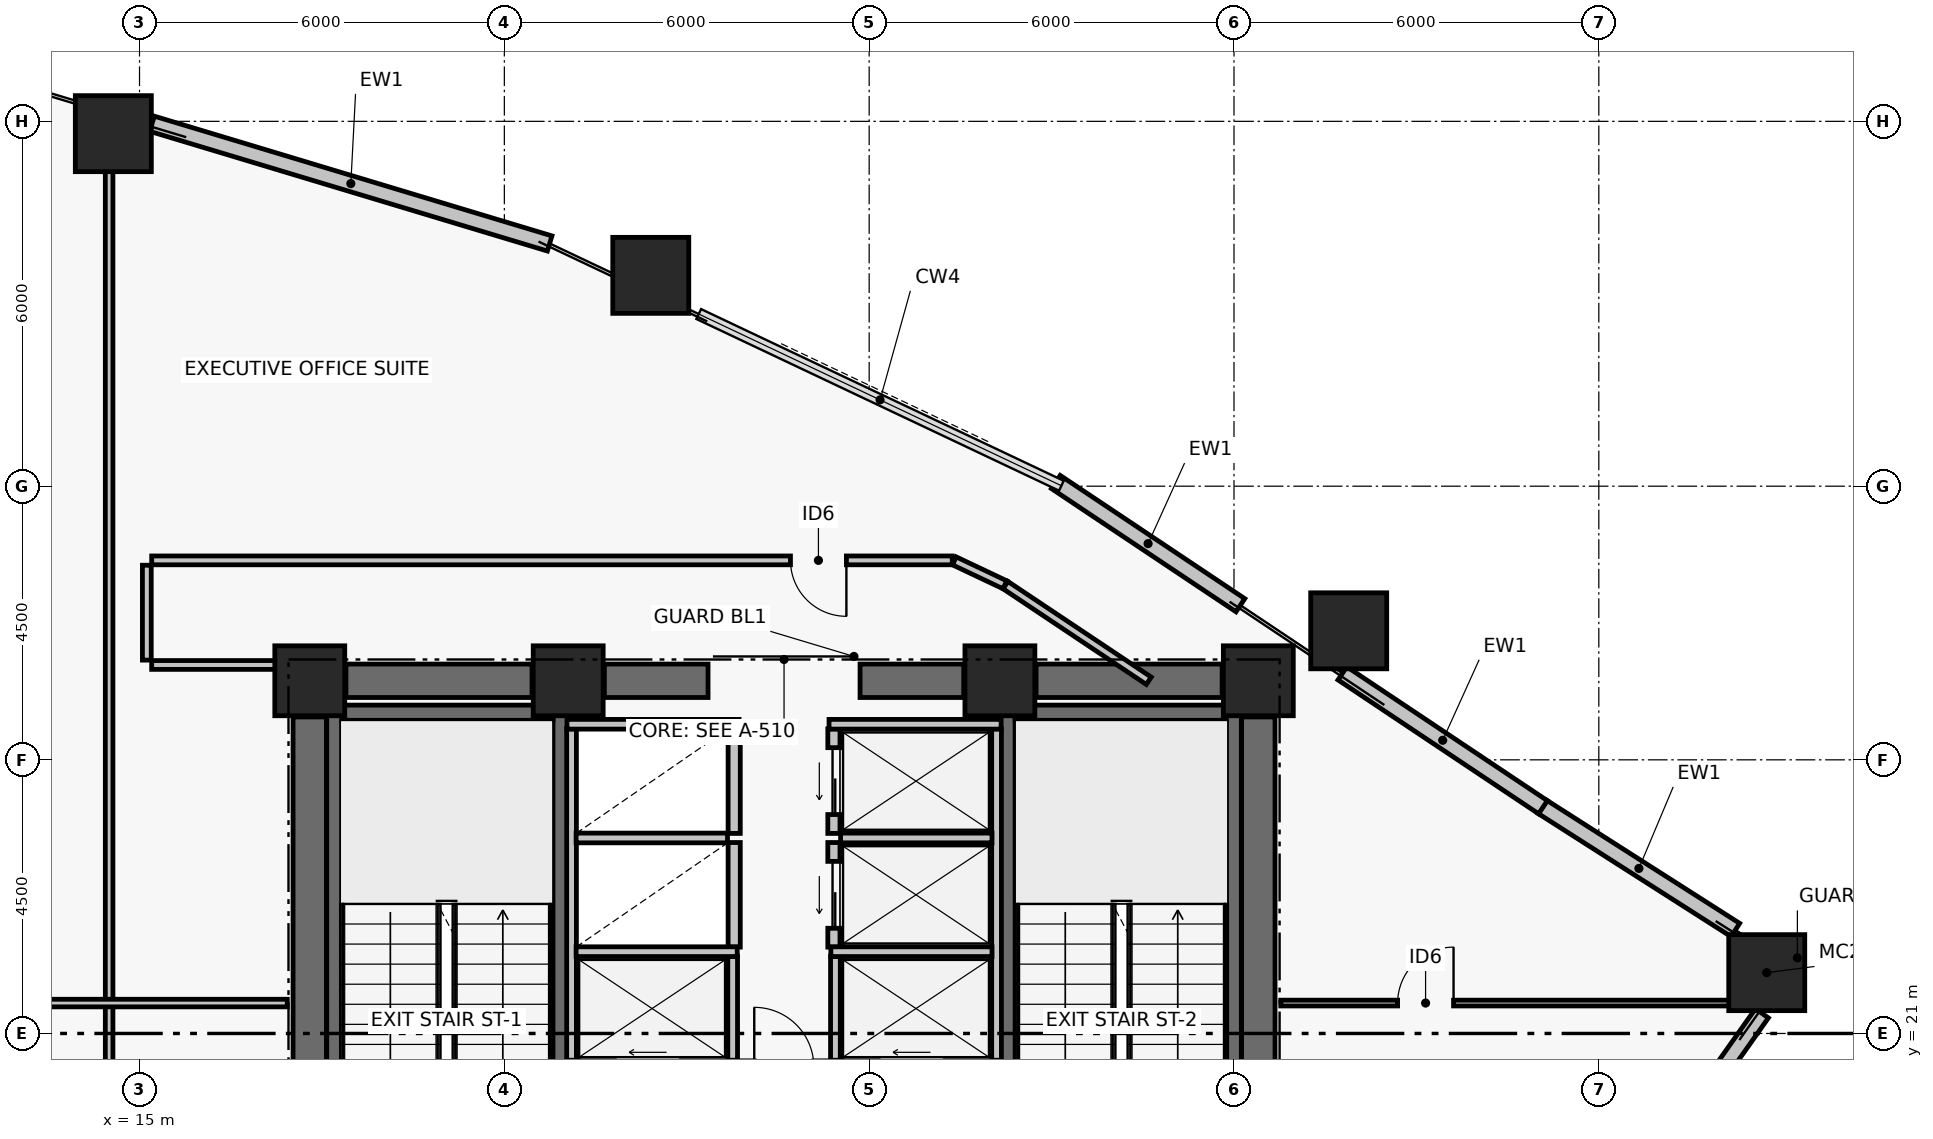
"""IFC4 building model, lengths in metres.
Left out: names, types, materials, properties, quantities, classifications, styles, units other than length and angle.
Written with IfcOpenShell. Run it as: python <this file> out.ifc"""

import sys

from ifc_helpers import new_model, si_unit, direction, frame, frame_2d, origin, origin_2d, place, context, subcontext, project, spatial, rectangle, hollow_rectangle, extrude, element, fill, save


model = new_model("IFC4")
c1 = context("Model", 3, precision=1e-05, world=origin(), true_north=direction((0.0, 1.0)))
c2 = subcontext(c1, "Body", "Model", "MODEL_VIEW")
j1 = project(units=[si_unit("LENGTHUNIT", "METRE"), si_unit("PLANEANGLEUNIT", "RADIAN")], contexts=[c1])
p1 = place(None, origin())
s1 = spatial("IfcSite", under=j1, at=p1, CompositionType="ELEMENT")
p2 = place(p1, origin())
s2 = spatial("IfcBuilding", under=s1, at=p2, CompositionType="ELEMENT")
p3 = place(p2, frame((0.0, 0.0, 103.98)))
s3 = spatial("IfcBuildingStorey", under=s2, at=p3, CompositionType="ELEMENT", Elevation=103.98)
for number, where, z_axis, x_axis in (
    (1, (17.8, 26.8, 0.0), (0.0, 0.0, 1.0), (1.0, 0.0, 0.0)),
    (2, (22.05, 26.8, 0.0), (0.0, 0.0, 1.0), (1.0, 0.0, 0.0)),
    (3, (29.15, 26.8, 0.0), (0.0, 0.0, 1.0), (1.0, 0.0, 0.0)),
    (4, (33.4, 26.8, 0.0), (0.0, 0.0, 1.0), (1.0, 0.0, 0.0)),
):
    element("IfcColumn", number, at=place(p3, frame(where, z_axis=z_axis, x_axis=x_axis)), inside=s3, PredefinedType="COLUMN", context=c2, shape_type="SweptSolid", body=[
        extrude(rectangle(XDim=1.15, YDim=1.15, at=origin_2d()), origin(), (0.0, 0.0, 1.0), 3.72),
    ])
p4 = place(p3, frame((18.395, 26.8, 0.0), z_axis=(0.0, 0.0, 1.0), x_axis=(1.0, 0.0, 0.0)))
e5 = element("IfcWall", 5, at=p4, inside=s3, PredefinedType="SHEAR", context=c2, shape_type="SweptSolid", body=[
    extrude(rectangle(XDim=3.06, YDim=0.55, at=frame_2d((1.53, 0.0))), origin(), (0.0, 0.0, 1.0), 3.47),
])
p5 = place(p3, frame((22.645, 26.8, 0.0), z_axis=(0.0, 0.0, 1.0), x_axis=(1.0, 0.0, 0.0)))
e6 = element("IfcWall", 6, at=p5, inside=s3, PredefinedType="SHEAR", context=c2, shape_type="SweptSolid", body=[
    extrude(rectangle(XDim=1.705, YDim=0.55, at=frame_2d((0.853, 0.0))), origin(), (0.0, 0.0, 1.0), 3.47),
])
p6 = place(p3, frame((26.85, 26.8, 0.0), z_axis=(0.0, 0.0, 1.0), x_axis=(1.0, 0.0, 0.0)))
e7 = element("IfcWall", 7, at=p6, inside=s3, PredefinedType="SHEAR", context=c2, shape_type="SweptSolid", body=[
    extrude(rectangle(XDim=1.705, YDim=0.55, at=frame_2d((0.853, 0.0))), origin(), (0.0, 0.0, 1.0), 3.47),
])
p7 = place(p3, frame((29.745, 26.8, 0.0), z_axis=(0.0, 0.0, 1.0), x_axis=(1.0, 0.0, 0.0)))
e8 = element("IfcWall", 8, at=p7, inside=s3, PredefinedType="SHEAR", context=c2, shape_type="SweptSolid", body=[
    extrude(rectangle(XDim=3.06, YDim=0.55, at=frame_2d((1.53, 0.0))), origin(), (0.0, 0.0, 1.0), 3.47),
])
for number, where, z_axis, x_axis in (
    (9, (17.8, 17.795, 0.0), (0.0, 0.0, 1.0), (0.0, 1.0, 0.0)),
    (10, (33.4, 17.795, 0.0), (0.0, 0.0, 1.0), (0.0, 1.0, 0.0)),
):
    element("IfcWall", number, at=place(p3, frame(where, z_axis=z_axis, x_axis=x_axis)), inside=s3, PredefinedType="SHEAR", context=c2, shape_type="SweptSolid", body=[
        extrude(rectangle(XDim=8.41, YDim=0.55, at=frame_2d((4.205, 0.0))), origin(), (0.0, 0.0, 1.0), 3.47),
    ])
p8 = place(p3, frame((18.204, 17.6, 0.0), z_axis=(0.0, 0.0, 1.0), x_axis=(0.0, 1.0, 0.0)))
e11 = element("IfcWall", 11, at=p8, inside=s3, PredefinedType="SHEAR", context=c2, shape_type="SweptSolid", body=[
    extrude(rectangle(XDim=8.8, YDim=0.25, at=frame_2d((4.4, 0.0))), origin(), (0.0, 0.0, 1.0), 3.47),
])
p9 = place(p3, frame((21.925, 17.6, 0.0), z_axis=(0.0, 0.0, 1.0), x_axis=(0.0, 1.0, 0.0)))
e12 = element("IfcWall", 12, at=p9, inside=s3, PredefinedType="SHEAR", context=c2, shape_type="SweptSolid", body=[
    extrude(rectangle(XDim=8.8, YDim=0.25, at=frame_2d((4.4, 0.0))), origin(), (0.0, 0.0, 1.0), 3.47),
])
p10 = place(p9, frame((0.35, 0.0, 0.0)))
e13 = element("IfcOpeningElement", 13, at=p10, cuts=e12, PredefinedType="OPENING", context=c2, shape_type="SweptSolid", body=[
    extrude(rectangle(XDim=1.05, YDim=2.08, at=frame_2d((0.525, 1.04))), frame((0.0, 0.135, 0.0), z_axis=(0.0, -1.0, 0.0), x_axis=(1.0, 0.0, 0.0)), (0.0, 0.0, 1.0), 0.27),
])
p11 = place(p3, frame((18.329, 26.275, 0.0), z_axis=(0.0, 0.0, 1.0), x_axis=(1.0, 0.0, 0.0)))
e14 = element("IfcWall", 14, at=p11, inside=s3, PredefinedType="SHEAR", context=c2, shape_type="SweptSolid", body=[
    extrude(rectangle(XDim=3.471, YDim=0.25, at=frame_2d((1.735, 0.0))), origin(), (0.0, 0.0, 1.0), 3.47),
])
p12 = place(p3, frame((29.275, 17.6, 0.0), z_axis=(0.0, 0.0, 1.0), x_axis=(0.0, 1.0, 0.0)))
e15 = element("IfcWall", 15, at=p12, inside=s3, PredefinedType="SHEAR", context=c2, shape_type="SweptSolid", body=[
    extrude(rectangle(XDim=8.8, YDim=0.25, at=frame_2d((4.4, 0.0))), origin(), (0.0, 0.0, 1.0), 3.47),
])
p13 = place(p12, frame((0.35, 0.0, 0.0)))
e16 = element("IfcOpeningElement", 16, at=p13, cuts=e15, PredefinedType="OPENING", context=c2, shape_type="SweptSolid", body=[
    extrude(rectangle(XDim=1.05, YDim=2.08, at=frame_2d((0.525, 1.04))), frame((0.0, 0.135, 0.0), z_axis=(0.0, -1.0, 0.0), x_axis=(1.0, 0.0, 0.0)), (0.0, 0.0, 1.0), 0.27),
])
p14 = place(p3, frame((32.996, 17.6, 0.0), z_axis=(0.0, 0.0, 1.0), x_axis=(0.0, 1.0, 0.0)))
e17 = element("IfcWall", 17, at=p14, inside=s3, PredefinedType="SHEAR", context=c2, shape_type="SweptSolid", body=[
    extrude(rectangle(XDim=8.8, YDim=0.25, at=frame_2d((4.4, 0.0))), origin(), (0.0, 0.0, 1.0), 3.47),
])
p15 = place(p3, frame((29.4, 26.275, 0.0), z_axis=(0.0, 0.0, 1.0), x_axis=(1.0, 0.0, 0.0)))
e18 = element("IfcWall", 18, at=p15, inside=s3, PredefinedType="SHEAR", context=c2, shape_type="SweptSolid", body=[
    extrude(rectangle(XDim=3.471, YDim=0.25, at=frame_2d((1.736, 0.0))), origin(), (0.0, 0.0, 1.0), 3.47),
])
for number, where, z_axis, x_axis in (
    (19, (41.762, 22.0, 0.0), (0.0, 0.0, 1.0), (1.0, 0.0, 0.0)),
    (20, (34.887, 27.622, 0.0), (0.0, 0.0, 1.0), (1.0, 0.0, 0.0)),
    (21, (23.408, 33.467, 0.0), (0.0, 0.0, 1.0), (1.0, 0.0, 0.0)),
    (22, (14.569, 35.797, 0.0), (0.0, 0.0, 1.0), (1.0, 0.0, 0.0)),
):
    element("IfcColumn", number, at=place(p3, frame(where, z_axis=z_axis, x_axis=x_axis)), inside=s3, PredefinedType="COLUMN", context=c2, shape_type="SweptSolid", body=[
        extrude(hollow_rectangle(XDim=1.25, YDim=1.25, WallThickness=0.05, at=origin_2d()), origin(), (0.0, 0.0, 1.0), 3.72),
    ])
p16 = place(p3, frame((41.682, 21.331, 0.0), z_axis=(0.0, 0.0, 1.0), x_axis=(-0.577134204686, -0.816649318729, 0.0)))
e23 = element("IfcWall", 23, at=p16, inside=s3, PredefinedType="PARTITIONING", context=c2, shape_type="SweptSolid", body=[
    extrude(rectangle(XDim=2.21, YDim=0.26, at=frame_2d((1.105, 0.0))), origin(), (0.0, 0.0, 1.0), 3.47),
])
p17 = place(p3, frame((38.072, 24.727, 0.0), z_axis=(0.0, 0.0, 1.0), x_axis=(0.843033549628, -0.537860980367, 0.0)))
e24 = element("IfcWall", 24, at=p17, inside=s3, PredefinedType="PARTITIONING", context=c2, shape_type="SweptSolid", body=[
    extrude(rectangle(XDim=3.766, YDim=0.26, at=frame_2d((1.883, 0.0))), origin(), (0.0, 0.0, 1.0), 2.9),
])
p18 = place(p3, frame((34.783, 26.922, 0.0), z_axis=(0.0, 0.0, 1.0), x_axis=(0.831718676225, -0.555197301523, 0.0)))
e25 = element("IfcWall", 25, at=p18, inside=s3, PredefinedType="PARTITIONING", context=c2, shape_type="SweptSolid", body=[
    extrude(rectangle(XDim=3.966, YDim=0.26, at=frame_2d((1.983, 0.0))), origin(), (0.0, 0.0, 1.0), 2.77),
])
p19 = place(p3, frame((30.07, 30.069, 0.0), z_axis=(0.0, 0.0, 1.0), x_axis=(0.831720838908, -0.555194061681, 0.0)))
e26 = element("IfcWall", 26, at=p19, inside=s3, PredefinedType="PARTITIONING", context=c2, shape_type="SweptSolid", body=[
    extrude(rectangle(XDim=3.65, YDim=0.26, at=frame_2d((1.825, 0.0))), origin(), (0.0, 0.0, 1.0), 2.9),
])
p20 = place(p3, frame((15.205, 35.961, 0.0), z_axis=(0.0, 0.0, 1.0), x_axis=(0.957547425539, -0.288275784351, 0.0)))
e27 = element("IfcWall", 27, at=p20, inside=s3, PredefinedType="PARTITIONING", context=c2, shape_type="SweptSolid", body=[
    extrude(rectangle(XDim=6.83, YDim=0.26, at=frame_2d((3.415, 0.0))), origin(), (0.0, 0.0, 1.0), 2.9),
])
for number, where, z_axis, x_axis in (
    (28, (24.78, 22.42, 0.0), (0.0, 0.0, 1.0), (0.0, 1.0, 0.0)),
    (29, (24.78, 24.29, 0.0), (0.0, 0.0, 1.0), (0.0, 1.0, 0.0)),
):
    element("IfcWall", number, at=place(p3, frame(where, z_axis=z_axis, x_axis=x_axis)), inside=s3, PredefinedType="PARTITIONING", context=c2, shape_type="SweptSolid", body=[
        extrude(rectangle(XDim=1.72, YDim=0.2, at=frame_2d((0.86, 0.0))), origin(), (0.0, 0.0, 1.0), 3.47),
    ])
p21 = place(p3, frame((26.42, 22.42, 0.0), z_axis=(0.0, 0.0, 1.0), x_axis=(0.0, 1.0, 0.0)))
e30 = element("IfcWall", 30, at=p21, inside=s3, PredefinedType="PARTITIONING", context=c2, shape_type="SweptSolid", body=[
    extrude(rectangle(XDim=1.72, YDim=0.2, at=frame_2d((0.86, 0.0))), origin(), (0.0, 0.0, 1.0), 3.47),
])
p22 = place(p21, frame((0.31, 0.0, 0.0)))
e31 = element("IfcOpeningElement", 31, at=p22, cuts=e30, PredefinedType="OPENING", context=c2, shape_type="SweptSolid", body=[
    extrude(rectangle(XDim=1.1, YDim=2.08, at=frame_2d((0.55, 1.04))), frame((0.0, 0.11, 0.0), z_axis=(0.0, -1.0, 0.0), x_axis=(1.0, 0.0, 0.0)), (0.0, 0.0, 1.0), 0.22),
])
p23 = place(p3, frame((26.42, 24.29, 0.0), z_axis=(0.0, 0.0, 1.0), x_axis=(0.0, 1.0, 0.0)))
e32 = element("IfcWall", 32, at=p23, inside=s3, PredefinedType="PARTITIONING", context=c2, shape_type="SweptSolid", body=[
    extrude(rectangle(XDim=1.72, YDim=0.2, at=frame_2d((0.86, 0.0))), origin(), (0.0, 0.0, 1.0), 3.47),
])
p24 = place(p23, frame((0.31, 0.0, 0.0)))
e33 = element("IfcOpeningElement", 33, at=p24, cuts=e32, PredefinedType="OPENING", context=c2, shape_type="SweptSolid", body=[
    extrude(rectangle(XDim=1.1, YDim=2.08, at=frame_2d((0.55, 1.04))), frame((0.0, 0.11, 0.0), z_axis=(0.0, -1.0, 0.0), x_axis=(1.0, 0.0, 0.0)), (0.0, 0.0, 1.0), 0.22),
])
p25 = place(p3, frame((22.105, 20.56, 0.0), z_axis=(0.0, 0.0, 1.0), x_axis=(0.0, 1.0, 0.0)))
e34 = element("IfcWall", 34, at=p25, inside=s3, PredefinedType="PARTITIONING", context=c2, shape_type="SweptSolid", body=[
    extrude(rectangle(XDim=5.45, YDim=0.16, at=frame_2d((2.725, 0.0))), origin(), (0.0, 0.0, 1.0), 3.47),
])
p26 = place(p3, frame((24.755, 20.56, 0.0), z_axis=(0.0, 0.0, 1.0), x_axis=(0.0, 1.0, 0.0)))
e35 = element("IfcWall", 35, at=p26, inside=s3, PredefinedType="PARTITIONING", context=c2, shape_type="SweptSolid", body=[
    extrude(rectangle(XDim=1.71, YDim=0.16, at=frame_2d((0.855, 0.0))), origin(), (0.0, 0.0, 1.0), 3.47),
])
p27 = place(p3, frame((22.18, 22.345, 0.0), z_axis=(0.0, 0.0, 1.0), x_axis=(1.0, 0.0, 0.0)))
e36 = element("IfcWall", 36, at=p27, inside=s3, PredefinedType="PARTITIONING", context=c2, shape_type="SweptSolid", body=[
    extrude(rectangle(XDim=2.65, YDim=0.16, at=frame_2d((1.325, 0.0))), origin(), (0.0, 0.0, 1.0), 3.47),
])
p28 = place(p3, frame((22.18, 24.215, 0.0), z_axis=(0.0, 0.0, 1.0), x_axis=(1.0, 0.0, 0.0)))
e37 = element("IfcWall", 37, at=p28, inside=s3, PredefinedType="PARTITIONING", context=c2, shape_type="SweptSolid", body=[
    extrude(rectangle(XDim=2.49, YDim=0.16, at=frame_2d((1.245, 0.0))), origin(), (0.0, 0.0, 1.0), 3.47),
])
p29 = place(p3, frame((22.03, 26.085, 0.0), z_axis=(0.0, 0.0, 1.0), x_axis=(1.0, 0.0, 0.0)))
e38 = element("IfcWall", 38, at=p29, inside=s3, PredefinedType="PARTITIONING", context=c2, shape_type="SweptSolid", body=[
    extrude(rectangle(XDim=2.83, YDim=0.16, at=frame_2d((1.415, 0.0))), origin(), (0.0, 0.0, 1.0), 3.47),
])
p30 = place(p3, frame((29.095, 20.56, 0.0), z_axis=(0.0, 0.0, 1.0), x_axis=(0.0, 1.0, 0.0)))
e39 = element("IfcWall", 39, at=p30, inside=s3, PredefinedType="PARTITIONING", context=c2, shape_type="SweptSolid", body=[
    extrude(rectangle(XDim=5.45, YDim=0.16, at=frame_2d((2.725, 0.0))), origin(), (0.0, 0.0, 1.0), 3.47),
])
p31 = place(p3, frame((26.445, 20.56, 0.0), z_axis=(0.0, 0.0, 1.0), x_axis=(0.0, 1.0, 0.0)))
e40 = element("IfcWall", 40, at=p31, inside=s3, PredefinedType="PARTITIONING", context=c2, shape_type="SweptSolid", body=[
    extrude(rectangle(XDim=1.71, YDim=0.16, at=frame_2d((0.855, 0.0))), origin(), (0.0, 0.0, 1.0), 3.47),
])
p32 = place(p3, frame((26.37, 22.345, 0.0), z_axis=(0.0, 0.0, 1.0), x_axis=(1.0, 0.0, 0.0)))
e41 = element("IfcWall", 41, at=p32, inside=s3, PredefinedType="PARTITIONING", context=c2, shape_type="SweptSolid", body=[
    extrude(rectangle(XDim=2.65, YDim=0.16, at=frame_2d((1.325, 0.0))), origin(), (0.0, 0.0, 1.0), 3.47),
])
p33 = place(p3, frame((26.53, 24.215, 0.0), z_axis=(0.0, 0.0, 1.0), x_axis=(1.0, 0.0, 0.0)))
e42 = element("IfcWall", 42, at=p33, inside=s3, PredefinedType="PARTITIONING", context=c2, shape_type="SweptSolid", body=[
    extrude(rectangle(XDim=2.49, YDim=0.16, at=frame_2d((1.245, 0.0))), origin(), (0.0, 0.0, 1.0), 3.47),
])
p34 = place(p3, frame((26.34, 26.085, 0.0), z_axis=(0.0, 0.0, 1.0), x_axis=(1.0, 0.0, 0.0)))
e43 = element("IfcWall", 43, at=p34, inside=s3, PredefinedType="PARTITIONING", context=c2, shape_type="SweptSolid", body=[
    extrude(rectangle(XDim=2.83, YDim=0.16, at=frame_2d((1.415, 0.0))), origin(), (0.0, 0.0, 1.0), 3.47),
])
p35 = place(p3, frame((31.598, 26.8, 0.0), z_axis=(0.0, 0.0, 1.0), x_axis=(-0.831758510993, 0.555137622028, 0.0)))
e44 = element("IfcWall", 44, at=p35, inside=s3, PredefinedType="PARTITIONING", context=c2, shape_type="SweptSolid", body=[
    extrude(rectangle(XDim=2.833, YDim=0.145, at=frame_2d((1.417, 0.0))), origin(), (0.0, 0.0, 1.0), 2.6),
])
p36 = place(p3, frame((29.232, 28.379, 0.0), z_axis=(0.0, 0.0, 1.0), x_axis=(-0.903829701814, 0.427892358098, 0.0)))
e45 = element("IfcWall", 45, at=p36, inside=s3, PredefinedType="PARTITIONING", context=c2, shape_type="SweptSolid", body=[
    extrude(rectangle(XDim=0.92, YDim=0.145, at=frame_2d((0.46, 0.0))), origin(), (0.0, 0.0, 1.0), 3.47),
])
p37 = place(p3, frame((28.366, 28.78, 0.0), z_axis=(0.0, 0.0, 1.0), x_axis=(-1.0, 0.0, 0.0)))
e46 = element("IfcWall", 46, at=p37, inside=s3, PredefinedType="PARTITIONING", context=c2, shape_type="SweptSolid", body=[
    extrude(rectangle(XDim=13.166, YDim=0.145, at=frame_2d((6.583, 0.0))), origin(), (0.0, 0.0, 1.0), 2.65),
])
p38 = place(p37, frame((1.741, 0.0, 0.0)))
e47 = element("IfcOpeningElement", 47, at=p38, cuts=e46, PredefinedType="OPENING", context=c2, shape_type="SweptSolid", body=[
    extrude(rectangle(XDim=0.92, YDim=2.05, at=frame_2d((0.46, 1.025))), frame((0.0, 0.083, 0.0), z_axis=(0.0, -1.0, 0.0), x_axis=(1.0, 0.0, 0.0)), (0.0, 0.0, 1.0), 0.165),
])
p39 = place(p3, frame((15.12, 28.7, 0.0), z_axis=(0.0, 0.0, 1.0), x_axis=(0.0, -1.0, 0.0)))
e48 = element("IfcWall", 48, at=p39, inside=s3, PredefinedType="PARTITIONING", context=c2, shape_type="SweptSolid", body=[
    extrude(rectangle(XDim=1.56, YDim=0.145, at=frame_2d((0.78, 0.0))), origin(), (0.0, 0.0, 1.0), 2.65),
])
p40 = place(p3, frame((15.2, 27.06, 0.0), z_axis=(0.0, 0.0, 1.0), x_axis=(1.0, 0.0, 0.0)))
e49 = element("IfcWall", 49, at=p40, inside=s3, PredefinedType="PARTITIONING", context=c2, shape_type="SweptSolid", body=[
    extrude(rectangle(XDim=2.18, YDim=0.145, at=frame_2d((1.09, 0.0))), origin(), (0.0, 0.0, 1.0), 2.65),
])
p41 = place(p3, frame((14.5, 7.535, 0.0), z_axis=(0.0, 0.0, 1.0), x_axis=(0.0, 1.0, 0.0)))
e50 = element("IfcWall", 50, at=p41, inside=s3, PredefinedType="PARTITIONING", context=c2, shape_type="SweptSolid", body=[
    extrude(rectangle(XDim=28.648, YDim=0.125, at=frame_2d((14.324, 0.0))), origin(), (0.0, 0.0, 1.0), 2.2),
])
p42 = place(p41, frame((11.325, 0.0, 0.0)))
e51 = element("IfcOpeningElement", 51, at=p42, cuts=e50, PredefinedType="OPENING", context=c2, shape_type="SweptSolid", body=[
    extrude(rectangle(XDim=0.92, YDim=2.05, at=frame_2d((0.46, 1.025))), frame((0.0, 0.073, 0.0), z_axis=(0.0, -1.0, 0.0), x_axis=(1.0, 0.0, 0.0)), (0.0, 0.0, 1.0), 0.145),
])
p43 = place(p3, frame((3.128, 21.5, 0.0), z_axis=(0.0, 0.0, 1.0), x_axis=(1.0, 0.0, 0.0)))
e52 = element("IfcWall", 52, at=p43, inside=s3, PredefinedType="PARTITIONING", context=c2, shape_type="SweptSolid", body=[
    extrude(rectangle(XDim=14.302, YDim=0.125, at=frame_2d((7.151, 0.0))), origin(), (0.0, 0.0, 1.0), 2.6),
])
p44 = place(p43, frame((0.28, 0.0, 0.0)))
e53 = element("IfcOpeningElement", 53, at=p44, cuts=e52, PredefinedType="OPENING", context=c2, shape_type="SweptSolid", body=[
    extrude(rectangle(XDim=0.92, YDim=2.05, at=frame_2d((0.46, 1.025))), frame((0.0, 0.073, 0.0), z_axis=(0.0, -1.0, 0.0), x_axis=(1.0, 0.0, 0.0)), (0.0, 0.0, 1.0), 0.145),
])
p45 = place(p3, frame((33.77, 21.5, 0.0), z_axis=(0.0, 0.0, 1.0), x_axis=(1.0, 0.0, 0.0)))
e54 = element("IfcWall", 54, at=p45, inside=s3, PredefinedType="PARTITIONING", context=c2, shape_type="SweptSolid", body=[
    extrude(rectangle(XDim=8.044, YDim=0.095, at=frame_2d((4.022, 0.0))), origin(), (0.0, 0.0, 1.0), 2.6),
])
p46 = place(p45, frame((1.921, 0.0, 0.0)))
e55 = element("IfcOpeningElement", 55, at=p46, cuts=e54, PredefinedType="OPENING", context=c2, shape_type="SweptSolid", body=[
    extrude(rectangle(XDim=0.92, YDim=2.05, at=frame_2d((0.46, 1.025))), frame((0.0, 0.057, 0.0), z_axis=(0.0, -1.0, 0.0), x_axis=(1.0, 0.0, 0.0)), (0.0, 0.0, 1.0), 0.115),
])
p47 = place(p22, origin())
e56 = element("IfcDoor", 56, at=p47, inside=s3, OperationType="DOUBLE_DOOR_SLIDING", PredefinedType="DOOR", context=c2, shape_type="SweptSolid", body=[
    extrude(rectangle(XDim=1.1, YDim=2.08, at=frame_2d((0.55, 1.04))), frame((0.0, 0.025, 0.0), z_axis=(0.0, -1.0, 0.0), x_axis=(1.0, 0.0, 0.0)), (0.0, 0.0, 1.0), 0.05),
])
fill(e31, e56)
p48 = place(p24, origin())
e57 = element("IfcDoor", 57, at=p48, inside=s3, OperationType="DOUBLE_DOOR_SLIDING", PredefinedType="DOOR", context=c2, shape_type="SweptSolid", body=[
    extrude(rectangle(XDim=1.1, YDim=2.08, at=frame_2d((0.55, 1.04))), frame((0.0, 0.025, 0.0), z_axis=(0.0, -1.0, 0.0), x_axis=(1.0, 0.0, 0.0)), (0.0, 0.0, 1.0), 0.05),
])
fill(e33, e57)
p49 = place(p38, origin())
e58 = element("IfcDoor", 58, at=p49, inside=s3, OperationType="SINGLE_SWING_LEFT", PredefinedType="DOOR", context=c2, shape_type="SweptSolid", body=[
    extrude(rectangle(XDim=0.92, YDim=2.05, at=frame_2d((0.46, 1.025))), frame((0.0, 0.025, 0.0), z_axis=(0.0, -1.0, 0.0), x_axis=(1.0, 0.0, 0.0)), (0.0, 0.0, 1.0), 0.05),
])
fill(e47, e58)
p50 = place(p46, origin())
e59 = element("IfcDoor", 59, at=p50, inside=s3, OperationType="SINGLE_SWING_RIGHT", PredefinedType="DOOR", context=c2, shape_type="SweptSolid", body=[
    extrude(rectangle(XDim=0.92, YDim=2.05, at=frame_2d((0.46, 1.025))), frame((0.0, 0.025, 0.0), z_axis=(0.0, -1.0, 0.0), x_axis=(1.0, 0.0, 0.0)), (0.0, 0.0, 1.0), 0.05),
])
fill(e55, e59)
save(model, sys.argv[1])
